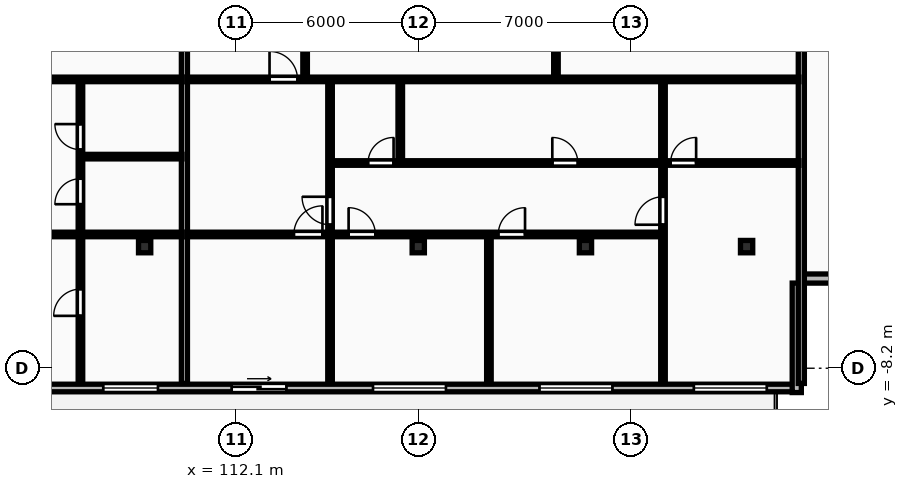
"""IFC4 building model, lengths in metres.
Left out: names, types, materials, properties, quantities, classifications, styles, units other than length and angle.
Written with IfcOpenShell. Run it as: python <this file> out.ifc"""

import sys

from ifc_helpers import new_model, si_unit, direction, frame, frame_2d, origin, origin_2d, place, context, subcontext, project, spatial, rectangle, i_section, extrude, element, fill, save


model = new_model("IFC4")
c1 = context("Model", 3, precision=1e-05, world=origin(), true_north=direction((0.0, 1.0)))
c2 = subcontext(c1, "Body", "Model", "MODEL_VIEW")
j1 = project(units=[si_unit("LENGTHUNIT", "METRE"), si_unit("PLANEANGLEUNIT", "RADIAN")], contexts=[c1])
p1 = place(None, origin())
s1 = spatial("IfcSite", under=j1, at=p1, CompositionType="ELEMENT")
p2 = place(p1, origin())
s2 = spatial("IfcBuilding", under=s1, at=p2, CompositionType="ELEMENT")
p3 = place(p2, frame((0.0, 0.0, 139.3)))
s3 = spatial("IfcBuildingStorey", under=s2, at=p3, CompositionType="ELEMENT", Elevation=139.3)
for number, where, z_axis, x_axis in (
    (1, (109.1, -4.2, 0.0), (0.0, 0.0, 1.0), (1.0, 0.0, 0.0)),
    (2, (118.1, -4.2, 0.0), (0.0, 0.0, 1.0), (1.0, 0.0, 0.0)),
    (3, (123.6, -4.2, 0.0), (0.0, 0.0, 1.0), (1.0, 0.0, 0.0)),
    (4, (128.9, -4.2, 0.0), (0.0, 0.0, 1.0), (1.0, 0.0, 0.0)),
):
    element("IfcColumn", number, at=place(p3, frame(where, z_axis=z_axis, x_axis=x_axis)), inside=s3, PredefinedType="COLUMN", context=c2, shape_type="SweptSolid", body=[
        extrude(i_section(OverallWidth=0.403, OverallDepth=0.406, WebThickness=0.027, FlangeThickness=0.043, FilletRadius=0.015, at=origin_2d()), origin(), (0.0, 0.0, 1.0), 3.6),
    ])
p4 = place(p3, frame((72.7, -8.85, 0.0), z_axis=(0.0, 0.0, 1.0), x_axis=(1.0, 0.0, 0.0)))
e5 = element("IfcWall", 5, at=p4, inside=s3, PredefinedType="STANDARD", context=c2, shape_type="SweptSolid", body=[
    extrude(rectangle(XDim=58.0, YDim=0.25, at=frame_2d((29.0, 0.0))), origin(), (0.0, 0.0, 1.0), 3.31),
])
p5 = place(p4, frame((6.625, 0.0, 0.85)))
e6 = element("IfcOpeningElement", 6, at=p5, cuts=e5, PredefinedType="OPENING", context=c2, shape_type="SweptSolid", body=[
    extrude(rectangle(XDim=2.4, YDim=1.9, at=frame_2d((1.2, 0.95))), frame((0.0, 0.135, 0.0), z_axis=(0.0, -1.0, 0.0), x_axis=(1.0, 0.0, 0.0)), (0.0, 0.0, 1.0), 0.27),
])
p6 = place(p4, frame((12.7, 0.0, 0.85)))
e7 = element("IfcOpeningElement", 7, at=p6, cuts=e5, PredefinedType="OPENING", context=c2, shape_type="SweptSolid", body=[
    extrude(rectangle(XDim=2.4, YDim=1.9, at=frame_2d((1.2, 0.95))), frame((0.0, 0.135, 0.0), z_axis=(0.0, -1.0, 0.0), x_axis=(1.0, 0.0, 0.0)), (0.0, 0.0, 1.0), 0.27),
])
p7 = place(p4, frame((1.345, 0.0, 0.0)))
e8 = element("IfcOpeningElement", 8, at=p7, cuts=e5, PredefinedType="OPENING", context=c2, shape_type="SweptSolid", body=[
    extrude(rectangle(XDim=1.8, YDim=2.2, at=frame_2d((0.9, 1.1))), frame((0.0, 0.135, 0.0), z_axis=(0.0, -1.0, 0.0), x_axis=(1.0, 0.0, 0.0)), (0.0, 0.0, 1.0), 0.27),
])
p8 = place(p4, frame((18.125, 0.0, 0.85)))
e9 = element("IfcOpeningElement", 9, at=p8, cuts=e5, PredefinedType="OPENING", context=c2, shape_type="SweptSolid", body=[
    extrude(rectangle(XDim=2.4, YDim=1.9, at=frame_2d((1.2, 0.95))), frame((0.0, 0.135, 0.0), z_axis=(0.0, -1.0, 0.0), x_axis=(1.0, 0.0, 0.0)), (0.0, 0.0, 1.0), 0.27),
])
p9 = place(p4, frame((27.429, 0.0, 0.0)))
e10 = element("IfcOpeningElement", 10, at=p9, cuts=e5, PredefinedType="OPENING", context=c2, shape_type="SweptSolid", body=[
    extrude(rectangle(XDim=1.8, YDim=2.2, at=frame_2d((0.9, 1.1))), frame((0.0, 0.135, 0.0), z_axis=(0.0, -1.0, 0.0), x_axis=(1.0, 0.0, 0.0)), (0.0, 0.0, 1.0), 0.27),
])
p10 = place(p4, frame((35.038, 0.0, 0.85)))
e11 = element("IfcOpeningElement", 11, at=p10, cuts=e5, PredefinedType="OPENING", context=c2, shape_type="SweptSolid", body=[
    extrude(rectangle(XDim=1.8, YDim=1.8, at=frame_2d((0.9, 0.9))), frame((0.0, 0.135, 0.0), z_axis=(0.0, -1.0, 0.0), x_axis=(1.0, 0.0, 0.0)), (0.0, 0.0, 1.0), 0.27),
])
p11 = place(p4, frame((43.911, 0.0, 0.85)))
e12 = element("IfcOpeningElement", 12, at=p11, cuts=e5, PredefinedType="OPENING", context=c2, shape_type="SweptSolid", body=[
    extrude(rectangle(XDim=2.4, YDim=1.9, at=frame_2d((1.2, 0.95))), frame((0.0, 0.135, 0.0), z_axis=(0.0, -1.0, 0.0), x_axis=(1.0, 0.0, 0.0)), (0.0, 0.0, 1.0), 0.27),
])
p12 = place(p4, frame((49.387, 0.0, 0.85)))
e13 = element("IfcOpeningElement", 13, at=p12, cuts=e5, PredefinedType="OPENING", context=c2, shape_type="SweptSolid", body=[
    extrude(rectangle(XDim=2.4, YDim=1.9, at=frame_2d((1.2, 0.95))), frame((0.0, 0.135, 0.0), z_axis=(0.0, -1.0, 0.0), x_axis=(1.0, 0.0, 0.0)), (0.0, 0.0, 1.0), 0.27),
])
p13 = place(p4, frame((39.263, 0.0, 0.0)))
e14 = element("IfcOpeningElement", 14, at=p13, cuts=e5, PredefinedType="OPENING", context=c2, shape_type="SweptSolid", body=[
    extrude(rectangle(XDim=1.8, YDim=2.2, at=frame_2d((0.9, 1.1))), frame((0.0, 0.135, 0.0), z_axis=(0.0, -1.0, 0.0), x_axis=(1.0, 0.0, 0.0)), (0.0, 0.0, 1.0), 0.27),
])
p14 = place(p4, frame((54.465, 0.0, 0.85)))
e15 = element("IfcOpeningElement", 15, at=p14, cuts=e5, PredefinedType="OPENING", context=c2, shape_type="SweptSolid", body=[
    extrude(rectangle(XDim=2.4, YDim=1.9, at=frame_2d((1.2, 0.95))), frame((0.0, 0.135, 0.0), z_axis=(0.0, -1.0, 0.0), x_axis=(1.0, 0.0, 0.0)), (0.0, 0.0, 1.0), 0.27),
])
for number, where, z_axis, x_axis in (
    (16, (130.55, -9.0, 0.0), (0.0, 0.0, 1.0), (0.0, 1.0, 0.0)),
    (17, (130.7, -5.25, 0.0), (0.0, 0.0, 1.0), (1.0, 0.0, 0.0)),
):
    element("IfcWall", number, at=place(p3, frame(where, z_axis=z_axis, x_axis=x_axis)), inside=s3, PredefinedType="STANDARD", context=c2, shape_type="SweptSolid", body=[
        extrude(rectangle(XDim=3.6, YDim=0.3, at=frame_2d((1.8, 0.0))), origin(), (0.0, 0.0, 1.0), 3.31),
    ])
for number, where, z_axis, x_axis in (
    (18, (130.7, -8.7, 0.0), (0.0, 0.0, 1.0), (0.0, 1.0, 0.0)),
    (19, (110.408, -8.7, 0.0), (0.0, 0.0, 1.0), (0.0, 1.0, 0.0)),
):
    element("IfcWall", number, at=place(p3, frame(where, z_axis=z_axis, x_axis=x_axis)), inside=s3, PredefinedType="PARTITIONING", context=c2, shape_type="SweptSolid", body=[
        extrude(rectangle(XDim=24.57, YDim=0.2, at=frame_2d((12.285, 0.0))), origin(), (0.0, 0.0, 1.0), 3.31),
    ])
p15 = place(p3, frame((107.048, -1.24, 0.0), z_axis=(0.0, 0.0, 1.0), x_axis=(1.0, 0.0, 0.0)))
e20 = element("IfcWall", 20, at=p15, inside=s3, PredefinedType="PARTITIONING", context=c2, shape_type="SweptSolid", body=[
    extrude(rectangle(XDim=3.28, YDim=0.15, at=frame_2d((1.64, 0.0))), origin(), (0.0, 0.0, 1.0), 3.31),
])
p16 = place(p3, frame((106.988, -8.7, 0.0), z_axis=(0.0, 0.0, 1.0), x_axis=(0.0, 1.0, 0.0)))
e21 = element("IfcWall", 21, at=p16, inside=s3, PredefinedType="PARTITIONING", context=c2, shape_type="SweptSolid", body=[
    extrude(rectangle(XDim=9.96, YDim=0.15, at=frame_2d((4.98, 0.0))), origin(), (0.0, 0.0, 1.0), 3.31),
])
p17 = place(p16, frame((5.894, 0.0, 0.0)))
e22 = element("IfcOpeningElement", 22, at=p17, cuts=e21, PredefinedType="OPENING", context=c2, shape_type="SweptSolid", body=[
    extrude(rectangle(XDim=0.84, YDim=2.04, at=frame_2d((0.42, 1.02))), frame((0.0, 0.085, 0.0), z_axis=(0.0, -1.0, 0.0), x_axis=(1.0, 0.0, 0.0)), (0.0, 0.0, 1.0), 0.17),
])
p18 = place(p16, frame((7.69, 0.0, 0.0)))
e23 = element("IfcOpeningElement", 23, at=p18, cuts=e21, PredefinedType="OPENING", context=c2, shape_type="SweptSolid", body=[
    extrude(rectangle(XDim=0.84, YDim=2.04, at=frame_2d((0.42, 1.02))), frame((0.0, 0.085, 0.0), z_axis=(0.0, -1.0, 0.0), x_axis=(1.0, 0.0, 0.0)), (0.0, 0.0, 1.0), 0.17),
])
p19 = place(p16, frame((2.223, 0.0, 0.0)))
e24 = element("IfcOpeningElement", 24, at=p19, cuts=e21, PredefinedType="OPENING", context=c2, shape_type="SweptSolid", body=[
    extrude(rectangle(XDim=0.88, YDim=2.06, at=frame_2d((0.44, 1.03))), frame((0.0, 0.085, 0.0), z_axis=(0.0, -1.0, 0.0), x_axis=(1.0, 0.0, 0.0)), (0.0, 0.0, 1.0), 0.17),
])
p20 = place(p3, frame((95.03, 1.3, 0.0), z_axis=(0.0, 0.0, 1.0), x_axis=(1.0, 0.0, 0.0)))
e25 = element("IfcWall", 25, at=p20, inside=s3, PredefinedType="PARTITIONING", context=c2, shape_type="SweptSolid", body=[
    extrude(rectangle(XDim=15.298, YDim=0.15, at=frame_2d((7.649, 0.0))), origin(), (0.0, 0.0, 1.0), 3.31),
])
p21 = place(p20, frame((2.72, 0.0, 0.0)))
e26 = element("IfcOpeningElement", 26, at=p21, cuts=e25, PredefinedType="OPENING", context=c2, shape_type="SweptSolid", body=[
    extrude(rectangle(XDim=0.92, YDim=2.08, at=frame_2d((0.46, 1.04))), frame((0.0, 0.085, 0.0), z_axis=(0.0, -1.0, 0.0), x_axis=(1.0, 0.0, 0.0)), (0.0, 0.0, 1.0), 0.17),
])
p22 = place(p3, frame((95.03, -3.8, 0.0), z_axis=(0.0, 0.0, 1.0), x_axis=(1.0, 0.0, 0.0)))
e27 = element("IfcWall", 27, at=p22, inside=s3, PredefinedType="PARTITIONING", context=c2, shape_type="SweptSolid", body=[
    extrude(rectangle(XDim=15.298, YDim=0.15, at=frame_2d((7.649, 0.0))), origin(), (0.0, 0.0, 1.0), 3.31),
])
p23 = place(p22, frame((7.179, 0.0, 0.0)))
e28 = element("IfcOpeningElement", 28, at=p23, cuts=e27, PredefinedType="OPENING", context=c2, shape_type="SweptSolid", body=[
    extrude(rectangle(XDim=0.94, YDim=2.1, at=frame_2d((0.47, 1.05))), frame((0.0, 0.085, 0.0), z_axis=(0.0, -1.0, 0.0), x_axis=(1.0, 0.0, 0.0)), (0.0, 0.0, 1.0), 0.17),
])
p24 = place(p3, frame((122.629, 1.34, 0.0), z_axis=(0.0, 0.0, 1.0), x_axis=(0.0, 1.0, 0.0)))
e29 = element("IfcWall", 29, at=p24, inside=s3, PredefinedType="PARTITIONING", context=c2, shape_type="SweptSolid", body=[
    extrude(rectangle(XDim=14.55, YDim=0.15, at=frame_2d((7.275, 0.0))), origin(), (0.0, 0.0, 1.0), 3.31),
])
p25 = place(p24, frame((3.177, 0.0, 0.0)))
e30 = element("IfcOpeningElement", 30, at=p25, cuts=e29, PredefinedType="OPENING", context=c2, shape_type="SweptSolid", body=[
    extrude(rectangle(XDim=0.84, YDim=2.04, at=frame_2d((0.42, 1.02))), frame((0.0, 0.085, 0.0), z_axis=(0.0, -1.0, 0.0), x_axis=(1.0, 0.0, 0.0)), (0.0, 0.0, 1.0), 0.17),
])
p26 = place(p24, frame((7.345, 0.0, 0.0)))
e31 = element("IfcOpeningElement", 31, at=p26, cuts=e29, PredefinedType="OPENING", context=c2, shape_type="SweptSolid", body=[
    extrude(rectangle(XDim=0.88, YDim=2.06, at=frame_2d((0.44, 1.03))), frame((0.0, 0.085, 0.0), z_axis=(0.0, -1.0, 0.0), x_axis=(1.0, 0.0, 0.0)), (0.0, 0.0, 1.0), 0.17),
])
p27 = place(p3, frame((114.378, 1.34, 0.0), z_axis=(0.0, 0.0, 1.0), x_axis=(0.0, 1.0, 0.0)))
e32 = element("IfcWall", 32, at=p27, inside=s3, PredefinedType="PARTITIONING", context=c2, shape_type="SweptSolid", body=[
    extrude(rectangle(XDim=14.55, YDim=0.15, at=frame_2d((7.275, 0.0))), origin(), (0.0, 0.0, 1.0), 3.31),
])
p28 = place(p27, frame((5.965, 0.0, 0.0)))
e33 = element("IfcOpeningElement", 33, at=p28, cuts=e32, PredefinedType="OPENING", context=c2, shape_type="SweptSolid", body=[
    extrude(rectangle(XDim=0.88, YDim=2.06, at=frame_2d((0.44, 1.03))), frame((0.0, 0.085, 0.0), z_axis=(0.0, -1.0, 0.0), x_axis=(1.0, 0.0, 0.0)), (0.0, 0.0, 1.0), 0.17),
])
p29 = place(p3, frame((117.508, -1.43, 0.0), z_axis=(0.0, 0.0, 1.0), x_axis=(0.0, 1.0, 0.0)))
e34 = element("IfcWall", 34, at=p29, inside=s3, PredefinedType="PARTITIONING", context=c2, shape_type="SweptSolid", body=[
    extrude(rectangle(XDim=2.69, YDim=0.15, at=frame_2d((1.345, 0.0))), origin(), (0.0, 0.0, 1.0), 3.31),
])
p30 = place(p3, frame((120.424, -8.7, 0.0), z_axis=(0.0, 0.0, 1.0), x_axis=(0.0, 1.0, 0.0)))
e35 = element("IfcWall", 35, at=p30, inside=s3, PredefinedType="PARTITIONING", context=c2, shape_type="SweptSolid", body=[
    extrude(rectangle(XDim=4.82, YDim=0.15, at=frame_2d((2.41, 0.0))), origin(), (0.0, 0.0, 1.0), 3.31),
])
p31 = place(p3, frame((115.198, -8.7, 0.0), z_axis=(0.0, 0.0, 1.0), x_axis=(0.0, 1.0, 0.0)))
e36 = element("IfcWall", 36, at=p31, inside=s3, PredefinedType="PARTITIONING", context=c2, shape_type="SweptSolid", body=[
    extrude(rectangle(XDim=9.96, YDim=0.15, at=frame_2d((4.98, 0.0))), origin(), (0.0, 0.0, 1.0), 3.31),
])
p32 = place(p31, frame((5.22, 0.0, 0.0)))
e37 = element("IfcOpeningElement", 37, at=p32, cuts=e36, PredefinedType="OPENING", context=c2, shape_type="SweptSolid", body=[
    extrude(rectangle(XDim=0.92, YDim=2.08, at=frame_2d((0.46, 1.04))), frame((0.0, 0.085, 0.0), z_axis=(0.0, -1.0, 0.0), x_axis=(1.0, 0.0, 0.0)), (0.0, 0.0, 1.0), 0.17),
])
p33 = place(p3, frame((126.15, -1.43, 0.0), z_axis=(0.0, 0.0, 1.0), x_axis=(0.0, 1.0, 0.0)))
e38 = element("IfcWall", 38, at=p33, inside=s3, PredefinedType="PARTITIONING", context=c2, shape_type="SweptSolid", body=[
    extrude(rectangle(XDim=2.69, YDim=0.15, at=frame_2d((1.345, 0.0))), origin(), (0.0, 0.0, 1.0), 3.31),
])
p34 = place(p3, frame((126.15, -8.7, 0.0), z_axis=(0.0, 0.0, 1.0), x_axis=(0.0, 1.0, 0.0)))
e39 = element("IfcWall", 39, at=p34, inside=s3, PredefinedType="PARTITIONING", context=c2, shape_type="SweptSolid", body=[
    extrude(rectangle(XDim=7.23, YDim=0.15, at=frame_2d((3.615, 0.0))), origin(), (0.0, 0.0, 1.0), 3.31),
])
p35 = place(p34, frame((5.22, 0.0, 0.0)))
e40 = element("IfcOpeningElement", 40, at=p35, cuts=e39, PredefinedType="OPENING", context=c2, shape_type="SweptSolid", body=[
    extrude(rectangle(XDim=0.92, YDim=2.08, at=frame_2d((0.46, 1.04))), frame((0.0, 0.085, 0.0), z_axis=(0.0, -1.0, 0.0), x_axis=(1.0, 0.0, 0.0)), (0.0, 0.0, 1.0), 0.17),
])
p36 = place(p3, frame((115.238, -1.45, 0.0), z_axis=(0.0, 0.0, 1.0), x_axis=(1.0, 0.0, 0.0)))
e41 = element("IfcWall", 41, at=p36, inside=s3, PredefinedType="PARTITIONING", context=c2, shape_type="SweptSolid", body=[
    extrude(rectangle(XDim=15.382, YDim=0.15, at=frame_2d((7.691, 0.0))), origin(), (0.0, 0.0, 1.0), 3.31),
])
p37 = place(p36, frame((1.21, 0.0, 0.0)))
e42 = element("IfcOpeningElement", 42, at=p37, cuts=e41, PredefinedType="OPENING", context=c2, shape_type="SweptSolid", body=[
    extrude(rectangle(XDim=0.84, YDim=2.04, at=frame_2d((0.42, 1.02))), frame((0.0, 0.085, 0.0), z_axis=(0.0, -1.0, 0.0), x_axis=(1.0, 0.0, 0.0)), (0.0, 0.0, 1.0), 0.17),
])
p38 = place(p36, frame((7.271, 0.0, 0.0)))
e43 = element("IfcOpeningElement", 43, at=p38, cuts=e41, PredefinedType="OPENING", context=c2, shape_type="SweptSolid", body=[
    extrude(rectangle(XDim=0.84, YDim=2.04, at=frame_2d((0.42, 1.02))), frame((0.0, 0.085, 0.0), z_axis=(0.0, -1.0, 0.0), x_axis=(1.0, 0.0, 0.0)), (0.0, 0.0, 1.0), 0.17),
])
p39 = place(p36, frame((11.162, 0.0, 0.0)))
e44 = element("IfcOpeningElement", 44, at=p39, cuts=e41, PredefinedType="OPENING", context=c2, shape_type="SweptSolid", body=[
    extrude(rectangle(XDim=0.84, YDim=2.04, at=frame_2d((0.42, 1.02))), frame((0.0, 0.085, 0.0), z_axis=(0.0, -1.0, 0.0), x_axis=(1.0, 0.0, 0.0)), (0.0, 0.0, 1.0), 0.17),
])
p40 = place(p3, frame((110.488, 1.3, 0.0), z_axis=(0.0, 0.0, 1.0), x_axis=(1.0, 0.0, 0.0)))
e45 = element("IfcWall", 45, at=p40, inside=s3, PredefinedType="PARTITIONING", context=c2, shape_type="SweptSolid", body=[
    extrude(rectangle(XDim=20.132, YDim=0.15, at=frame_2d((10.066, 0.0))), origin(), (0.0, 0.0, 1.0), 3.31),
])
p41 = place(p40, frame((2.72, 0.0, 0.0)))
e46 = element("IfcOpeningElement", 46, at=p41, cuts=e45, PredefinedType="OPENING", context=c2, shape_type="SweptSolid", body=[
    extrude(rectangle(XDim=0.92, YDim=2.08, at=frame_2d((0.46, 1.04))), frame((0.0, 0.085, 0.0), z_axis=(0.0, -1.0, 0.0), x_axis=(1.0, 0.0, 0.0)), (0.0, 0.0, 1.0), 0.17),
])
p42 = place(p3, frame((110.488, -3.8, 0.0), z_axis=(0.0, 0.0, 1.0), x_axis=(1.0, 0.0, 0.0)))
e47 = element("IfcWall", 47, at=p42, inside=s3, PredefinedType="PARTITIONING", context=c2, shape_type="SweptSolid", body=[
    extrude(rectangle(XDim=15.662, YDim=0.15, at=frame_2d((7.831, 0.0))), origin(), (0.0, 0.0, 1.0), 3.31),
])
p43 = place(p42, frame((3.52, 0.0, 0.0)))
e48 = element("IfcOpeningElement", 48, at=p43, cuts=e47, PredefinedType="OPENING", context=c2, shape_type="SweptSolid", body=[
    extrude(rectangle(XDim=0.94, YDim=2.1, at=frame_2d((0.47, 1.05))), frame((0.0, 0.085, 0.0), z_axis=(0.0, -1.0, 0.0), x_axis=(1.0, 0.0, 0.0)), (0.0, 0.0, 1.0), 0.17),
])
p44 = place(p42, frame((5.321, 0.0, 0.0)))
e49 = element("IfcOpeningElement", 49, at=p44, cuts=e47, PredefinedType="OPENING", context=c2, shape_type="SweptSolid", body=[
    extrude(rectangle(XDim=0.88, YDim=2.06, at=frame_2d((0.44, 1.03))), frame((0.0, 0.085, 0.0), z_axis=(0.0, -1.0, 0.0), x_axis=(1.0, 0.0, 0.0)), (0.0, 0.0, 1.0), 0.17),
])
p45 = place(p42, frame((10.244, 0.0, 0.0)))
e50 = element("IfcOpeningElement", 50, at=p45, cuts=e47, PredefinedType="OPENING", context=c2, shape_type="SweptSolid", body=[
    extrude(rectangle(XDim=0.88, YDim=2.06, at=frame_2d((0.44, 1.03))), frame((0.0, 0.085, 0.0), z_axis=(0.0, -1.0, 0.0), x_axis=(1.0, 0.0, 0.0)), (0.0, 0.0, 1.0), 0.17),
])
p46 = place(p10, origin())
e51 = element("IfcWindow", 51, at=p46, inside=s3, PartitioningType="SINGLE_PANEL", PredefinedType="WINDOW", context=c2, shape_type="SweptSolid", body=[
    extrude(rectangle(XDim=1.8, YDim=1.8, at=frame_2d((0.9, 0.9))), frame((0.0, 0.03, 0.0), z_axis=(0.0, -1.0, 0.0), x_axis=(1.0, 0.0, 0.0)), (0.0, 0.0, 1.0), 0.06),
])
fill(e11, e51)
p47 = place(p11, origin())
e52 = element("IfcWindow", 52, at=p47, inside=s3, PartitioningType="DOUBLE_PANEL_VERTICAL", PredefinedType="WINDOW", context=c2, shape_type="SweptSolid", body=[
    extrude(rectangle(XDim=2.4, YDim=1.9, at=frame_2d((1.2, 0.95))), frame((0.0, 0.03, 0.0), z_axis=(0.0, -1.0, 0.0), x_axis=(1.0, 0.0, 0.0)), (0.0, 0.0, 1.0), 0.06),
])
fill(e12, e52)
p48 = place(p12, origin())
e53 = element("IfcWindow", 53, at=p48, inside=s3, PartitioningType="DOUBLE_PANEL_VERTICAL", PredefinedType="WINDOW", context=c2, shape_type="SweptSolid", body=[
    extrude(rectangle(XDim=2.4, YDim=1.9, at=frame_2d((1.2, 0.95))), frame((0.0, 0.03, 0.0), z_axis=(0.0, -1.0, 0.0), x_axis=(1.0, 0.0, 0.0)), (0.0, 0.0, 1.0), 0.06),
])
fill(e13, e53)
p49 = place(p13, origin())
e54 = element("IfcDoor", 54, at=p49, inside=s3, OperationType="SLIDING_TO_RIGHT", PredefinedType="DOOR", context=c2, shape_type="SweptSolid", body=[
    extrude(rectangle(XDim=1.8, YDim=2.2, at=frame_2d((0.9, 1.1))), frame((0.0, 0.025, 0.0), z_axis=(0.0, -1.0, 0.0), x_axis=(1.0, 0.0, 0.0)), (0.0, 0.0, 1.0), 0.05),
])
fill(e14, e54)
p50 = place(p14, origin())
e55 = element("IfcWindow", 55, at=p50, inside=s3, PartitioningType="DOUBLE_PANEL_VERTICAL", PredefinedType="WINDOW", context=c2, shape_type="SweptSolid", body=[
    extrude(rectangle(XDim=2.4, YDim=1.9, at=frame_2d((1.2, 0.95))), frame((0.0, 0.03, 0.0), z_axis=(0.0, -1.0, 0.0), x_axis=(1.0, 0.0, 0.0)), (0.0, 0.0, 1.0), 0.06),
])
fill(e15, e55)
p51 = place(p17, origin())
e56 = element("IfcDoor", 56, at=p51, inside=s3, OperationType="SINGLE_SWING_LEFT", PredefinedType="DOOR", context=c2, shape_type="SweptSolid", body=[
    extrude(rectangle(XDim=0.84, YDim=2.04, at=frame_2d((0.42, 1.02))), frame((0.0, 0.025, 0.0), z_axis=(0.0, -1.0, 0.0), x_axis=(1.0, 0.0, 0.0)), (0.0, 0.0, 1.0), 0.05),
])
fill(e22, e56)
p52 = place(p18, origin())
e57 = element("IfcDoor", 57, at=p52, inside=s3, OperationType="SINGLE_SWING_RIGHT", PredefinedType="DOOR", context=c2, shape_type="SweptSolid", body=[
    extrude(rectangle(XDim=0.84, YDim=2.04, at=frame_2d((0.42, 1.02))), frame((0.0, 0.025, 0.0), z_axis=(0.0, -1.0, 0.0), x_axis=(1.0, 0.0, 0.0)), (0.0, 0.0, 1.0), 0.05),
])
fill(e23, e57)
p53 = place(p19, origin())
e58 = element("IfcDoor", 58, at=p53, inside=s3, OperationType="SINGLE_SWING_LEFT", PredefinedType="DOOR", context=c2, shape_type="SweptSolid", body=[
    extrude(rectangle(XDim=0.88, YDim=2.06, at=frame_2d((0.44, 1.03))), frame((0.0, 0.025, 0.0), z_axis=(0.0, -1.0, 0.0), x_axis=(1.0, 0.0, 0.0)), (0.0, 0.0, 1.0), 0.05),
])
fill(e24, e58)
p54 = place(p32, origin())
e59 = element("IfcDoor", 59, at=p54, inside=s3, OperationType="SINGLE_SWING_RIGHT", PredefinedType="DOOR", context=c2, shape_type="SweptSolid", body=[
    extrude(rectangle(XDim=0.92, YDim=2.08, at=frame_2d((0.46, 1.04))), frame((0.0, 0.025, 0.0), z_axis=(0.0, -1.0, 0.0), x_axis=(1.0, 0.0, 0.0)), (0.0, 0.0, 1.0), 0.05),
])
fill(e37, e59)
p55 = place(p35, origin())
e60 = element("IfcDoor", 60, at=p55, inside=s3, OperationType="SINGLE_SWING_LEFT", PredefinedType="DOOR", context=c2, shape_type="SweptSolid", body=[
    extrude(rectangle(XDim=0.92, YDim=2.08, at=frame_2d((0.46, 1.04))), frame((0.0, 0.025, 0.0), z_axis=(0.0, -1.0, 0.0), x_axis=(1.0, 0.0, 0.0)), (0.0, 0.0, 1.0), 0.05),
])
fill(e40, e60)
p56 = place(p37, origin())
e61 = element("IfcDoor", 61, at=p56, inside=s3, OperationType="SINGLE_SWING_RIGHT", PredefinedType="DOOR", context=c2, shape_type="SweptSolid", body=[
    extrude(rectangle(XDim=0.84, YDim=2.04, at=frame_2d((0.42, 1.02))), frame((0.0, 0.025, 0.0), z_axis=(0.0, -1.0, 0.0), x_axis=(1.0, 0.0, 0.0)), (0.0, 0.0, 1.0), 0.05),
])
fill(e42, e61)
p57 = place(p38, origin())
e62 = element("IfcDoor", 62, at=p57, inside=s3, OperationType="SINGLE_SWING_LEFT", PredefinedType="DOOR", context=c2, shape_type="SweptSolid", body=[
    extrude(rectangle(XDim=0.84, YDim=2.04, at=frame_2d((0.42, 1.02))), frame((0.0, 0.025, 0.0), z_axis=(0.0, -1.0, 0.0), x_axis=(1.0, 0.0, 0.0)), (0.0, 0.0, 1.0), 0.05),
])
fill(e43, e62)
p58 = place(p39, origin())
e63 = element("IfcDoor", 63, at=p58, inside=s3, OperationType="SINGLE_SWING_RIGHT", PredefinedType="DOOR", context=c2, shape_type="SweptSolid", body=[
    extrude(rectangle(XDim=0.84, YDim=2.04, at=frame_2d((0.42, 1.02))), frame((0.0, 0.025, 0.0), z_axis=(0.0, -1.0, 0.0), x_axis=(1.0, 0.0, 0.0)), (0.0, 0.0, 1.0), 0.05),
])
fill(e44, e63)
p59 = place(p41, origin())
e64 = element("IfcDoor", 64, at=p59, inside=s3, OperationType="SINGLE_SWING_LEFT", PredefinedType="DOOR", context=c2, shape_type="SweptSolid", body=[
    extrude(rectangle(XDim=0.92, YDim=2.08, at=frame_2d((0.46, 1.04))), frame((0.0, 0.025, 0.0), z_axis=(0.0, -1.0, 0.0), x_axis=(1.0, 0.0, 0.0)), (0.0, 0.0, 1.0), 0.05),
])
fill(e46, e64)
p60 = place(p43, origin())
e65 = element("IfcDoor", 65, at=p60, inside=s3, OperationType="SINGLE_SWING_RIGHT", PredefinedType="DOOR", context=c2, shape_type="SweptSolid", body=[
    extrude(rectangle(XDim=0.94, YDim=2.1, at=frame_2d((0.47, 1.05))), frame((0.0, 0.025, 0.0), z_axis=(0.0, -1.0, 0.0), x_axis=(1.0, 0.0, 0.0)), (0.0, 0.0, 1.0), 0.05),
])
fill(e48, e65)
p61 = place(p44, origin())
e66 = element("IfcDoor", 66, at=p61, inside=s3, OperationType="SINGLE_SWING_LEFT", PredefinedType="DOOR", context=c2, shape_type="SweptSolid", body=[
    extrude(rectangle(XDim=0.88, YDim=2.06, at=frame_2d((0.44, 1.03))), frame((0.0, 0.025, 0.0), z_axis=(0.0, -1.0, 0.0), x_axis=(1.0, 0.0, 0.0)), (0.0, 0.0, 1.0), 0.05),
])
fill(e49, e66)
p62 = place(p45, origin())
e67 = element("IfcDoor", 67, at=p62, inside=s3, OperationType="SINGLE_SWING_RIGHT", PredefinedType="DOOR", context=c2, shape_type="SweptSolid", body=[
    extrude(rectangle(XDim=0.88, YDim=2.06, at=frame_2d((0.44, 1.03))), frame((0.0, 0.025, 0.0), z_axis=(0.0, -1.0, 0.0), x_axis=(1.0, 0.0, 0.0)), (0.0, 0.0, 1.0), 0.05),
])
fill(e50, e67)
save(model, sys.argv[1])
